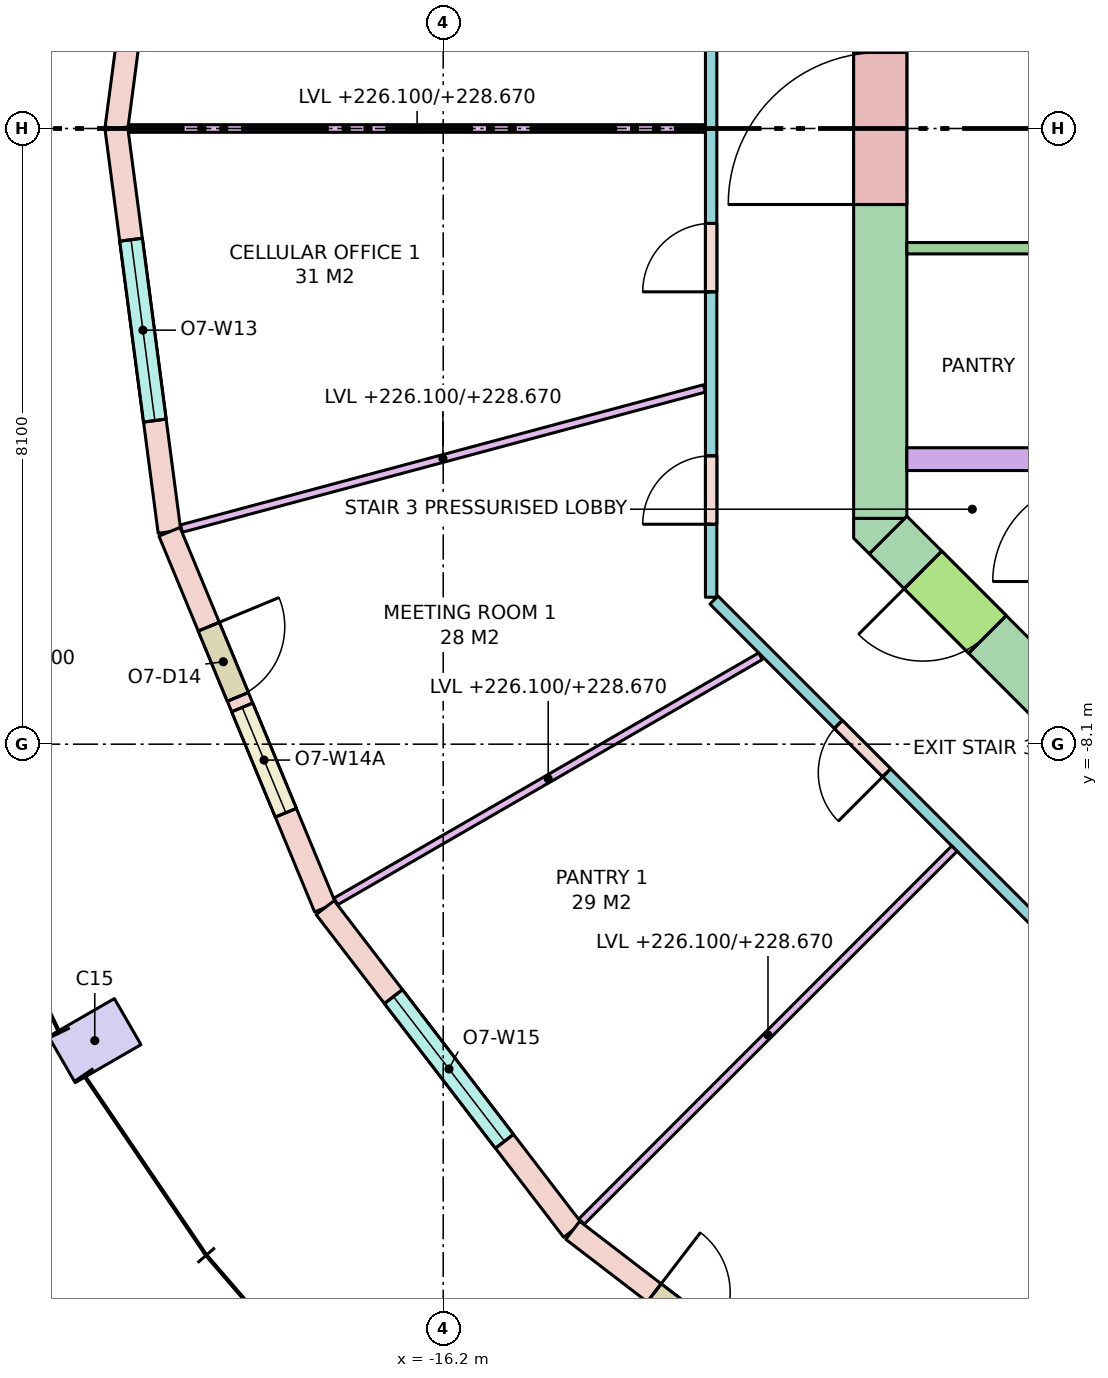
"""IFC4 building model, lengths in metres.
Left out: names, types, materials, properties, quantities, classifications, styles, units other than length and angle.
Written with IfcOpenShell. Run it as: python <this file> out.ifc"""

import sys

from ifc_helpers import new_model, si_unit, direction, frame, frame_2d, origin, origin_2d, place, context, subcontext, project, spatial, polyline, rectangle, outline, extrude, element, fill, save


model = new_model("IFC4")
c1 = context("Model", 3, precision=1e-05, world=origin(), true_north=direction((0.0, 1.0)))
c2 = subcontext(c1, "Body", "Model", "MODEL_VIEW")
j1 = project(units=[si_unit("LENGTHUNIT", "METRE"), si_unit("PLANEANGLEUNIT", "RADIAN")], contexts=[c1])
p1 = place(None, origin())
s1 = spatial("IfcSite", under=j1, at=p1, CompositionType="ELEMENT")
p2 = place(p1, origin())
s2 = spatial("IfcBuilding", under=s1, at=p2, CompositionType="ELEMENT")
p3 = place(p2, frame((0.0, 0.0, 226.1)))
s3 = spatial("IfcBuildingStorey", under=s2, at=p3, CompositionType="ELEMENT", Elevation=226.1)
p4 = place(p3, frame((-20.785, -12.0, 0.0), z_axis=(0.0, 0.0, 1.0), x_axis=(0.5, -0.866025403784, 0.0)))
e1 = element("IfcColumn", 1, at=p4, inside=s3, PredefinedType="COLUMN", context=c2, shape_type="SweptSolid", body=[
    extrude(rectangle(XDim=0.7, YDim=1.0, at=origin_2d()), origin(), (0.0, 0.0, 1.0), 3.7),
])
p5 = place(p3, frame((-10.45, -5.13, -0.28), z_axis=(0.0, 0.0, 1.0), x_axis=(0.0, 1.0, 0.0)))
e2 = element("IfcWall", 2, at=p5, inside=s3, PredefinedType="SHEAR", context=c2, shape_type="SweptSolid", body=[
    extrude(rectangle(XDim=10.26, YDim=0.7, at=frame_2d((5.13, 0.0))), origin(), (0.0, 0.0, 1.0), 3.7),
])
p6 = place(p5, frame((4.13, 0.0, 0.28)))
e3 = element("IfcOpeningElement", 3, at=p6, cuts=e2, PredefinedType="OPENING", context=c2, shape_type="SweptSolid", body=[
    extrude(rectangle(XDim=2.0, YDim=2.1, at=frame_2d((1.0, 1.05))), frame((0.0, 0.36, 0.0), z_axis=(0.0, -1.0, 0.0), x_axis=(1.0, 0.0, 0.0)), (0.0, 0.0, 1.0), 0.72),
])
p7 = place(p3, frame((-7.347, -8.347, -0.28), z_axis=(0.0, 0.0, 1.0), x_axis=(-0.707106781187, 0.707106781187, 0.0)))
e4 = element("IfcWall", 4, at=p7, inside=s3, PredefinedType="SHEAR", context=c2, shape_type="SweptSolid", body=[
    extrude(rectangle(XDim=4.243, YDim=0.7, at=frame_2d((2.121, 0.0))), origin(), (0.0, 0.0, 1.0), 3.7),
])
p8 = place(p7, frame((2.393, 0.0, 0.28)))
e5 = element("IfcOpeningElement", 5, at=p8, cuts=e4, PredefinedType="OPENING", context=c2, shape_type="SweptSolid", body=[
    extrude(rectangle(XDim=1.2, YDim=2.1, at=frame_2d((0.6, 1.05))), frame((0.0, 0.36, 0.0), z_axis=(0.0, -1.0, 0.0), x_axis=(1.0, 0.0, 0.0)), (0.0, 0.0, 1.0), 0.72),
])
p9 = place(p3, frame((0.0, 0.0, -0.28)))
e6 = element("IfcWall", 6, at=p9, inside=s3, PredefinedType="SHEAR", context=c2, shape_type="SweptSolid", body=[
    extrude(outline(polyline([(-10.8, -5.39), (-10.8, -5.13), (-10.8, -5.13), (-10.13, -5.13), (-10.595, -5.595), (-10.595, -5.595), (-10.595, -5.595), (-10.8, -5.39)])), origin(), (0.0, 0.0, 1.0), 3.7),
])
p10 = place(p3, frame((-10.1, -4.35, 0.0), z_axis=(0.0, 0.0, 1.0), x_axis=(1.0, 0.0, 0.0)))
e7 = element("IfcWall", 7, at=p10, inside=s3, PredefinedType="SOLIDWALL", context=c2, shape_type="SweptSolid", body=[
    extrude(rectangle(XDim=8.1, YDim=0.3, at=frame_2d((4.05, 0.0))), origin(), (0.0, 0.0, 1.0), 3.42),
])
p11 = place(p3, frame((-19.802, 5.306, 0.0), z_axis=(0.0, 0.0, 1.0), x_axis=(-0.130517056518, -0.991446064069, 0.0)))
e8 = element("IfcWall", 8, at=p11, inside=s3, PredefinedType="STANDARD", context=c2, shape_type="SweptSolid", body=[
    extrude(rectangle(XDim=5.352, YDim=0.3, at=frame_2d((2.676, 0.0))), origin(), (0.0, 0.0, 1.0), 3.42),
])
p12 = place(p11, frame((1.351, 0.0, 0.0)))
e9 = element("IfcOpeningElement", 9, at=p12, cuts=e8, PredefinedType="OPENING", context=c2, shape_type="SweptSolid", body=[
    extrude(rectangle(XDim=1.0, YDim=2.4, at=frame_2d((0.5, 1.2))), frame((0.0, 0.16, 0.0), z_axis=(0.0, -1.0, 0.0), x_axis=(1.0, 0.0, 0.0)), (0.0, 0.0, 1.0), 0.32),
])
p13 = place(p11, frame((2.501, 0.0, 0.8)))
e10 = element("IfcOpeningElement", 10, at=p13, cuts=e8, PredefinedType="OPENING", context=c2, shape_type="SweptSolid", body=[
    extrude(rectangle(XDim=1.5, YDim=2.4, at=frame_2d((0.75, 1.2))), frame((0.0, 0.16, 0.0), z_axis=(0.0, -1.0, 0.0), x_axis=(1.0, 0.0, 0.0)), (0.0, 0.0, 1.0), 0.32),
])
p14 = place(p3, frame((-20.5, 0.0, 0.0), z_axis=(0.0, 0.0, 1.0), x_axis=(0.130517056518, -0.991446064069, 0.0)))
e11 = element("IfcWall", 11, at=p14, inside=s3, PredefinedType="STANDARD", context=c2, shape_type="SweptSolid", body=[
    extrude(rectangle(XDim=5.352, YDim=0.3, at=frame_2d((2.676, 0.0))), origin(), (0.0, 0.0, 1.0), 3.42),
])
p15 = place(p14, frame((1.476, 0.0, 0.8)))
e12 = element("IfcOpeningElement", 12, at=p15, cuts=e11, PredefinedType="OPENING", context=c2, shape_type="SweptSolid", body=[
    extrude(rectangle(XDim=2.4, YDim=2.4, at=frame_2d((1.2, 1.2))), frame((0.0, 0.16, 0.0), z_axis=(0.0, -1.0, 0.0), x_axis=(1.0, 0.0, 0.0)), (0.0, 0.0, 1.0), 0.32),
])
p16 = place(p3, frame((-19.802, -5.306, 0.0), z_axis=(0.0, 0.0, 1.0), x_axis=(0.382713071139, -0.923867255172, 0.0)))
e13 = element("IfcWall", 13, at=p16, inside=s3, PredefinedType="STANDARD", context=c2, shape_type="SweptSolid", body=[
    extrude(rectangle(XDim=5.352, YDim=0.3, at=frame_2d((2.676, 0.0))), origin(), (0.0, 0.0, 1.0), 3.42),
])
p17 = place(p16, frame((1.351, 0.0, 0.0)))
e14 = element("IfcOpeningElement", 14, at=p17, cuts=e13, PredefinedType="OPENING", context=c2, shape_type="SweptSolid", body=[
    extrude(rectangle(XDim=1.0, YDim=2.4, at=frame_2d((0.5, 1.2))), frame((0.0, 0.16, 0.0), z_axis=(0.0, -1.0, 0.0), x_axis=(1.0, 0.0, 0.0)), (0.0, 0.0, 1.0), 0.32),
])
p18 = place(p16, frame((2.501, 0.0, 0.8)))
e15 = element("IfcOpeningElement", 15, at=p18, cuts=e13, PredefinedType="OPENING", context=c2, shape_type="SweptSolid", body=[
    extrude(rectangle(XDim=1.5, YDim=2.4, at=frame_2d((0.75, 1.2))), frame((0.0, 0.16, 0.0), z_axis=(0.0, -1.0, 0.0), x_axis=(1.0, 0.0, 0.0)), (0.0, 0.0, 1.0), 0.32),
])
p19 = place(p3, frame((-17.753, -10.25, 0.0), z_axis=(0.0, 0.0, 1.0), x_axis=(0.60876670321, -0.793349293227, 0.0)))
e16 = element("IfcWall", 16, at=p19, inside=s3, PredefinedType="STANDARD", context=c2, shape_type="SweptSolid", body=[
    extrude(rectangle(XDim=5.352, YDim=0.3, at=frame_2d((2.676, 0.0))), origin(), (0.0, 0.0, 1.0), 3.42),
])
p20 = place(p19, frame((1.476, 0.0, 0.8)))
e17 = element("IfcOpeningElement", 17, at=p20, cuts=e16, PredefinedType="OPENING", context=c2, shape_type="SweptSolid", body=[
    extrude(rectangle(XDim=2.4, YDim=2.4, at=frame_2d((1.2, 1.2))), frame((0.0, 0.16, 0.0), z_axis=(0.0, -1.0, 0.0), x_axis=(1.0, 0.0, 0.0)), (0.0, 0.0, 1.0), 0.32),
])
p21 = place(p3, frame((-14.496, -14.496, 0.0), z_axis=(0.0, 0.0, 1.0), x_axis=(0.793349293227, -0.60876670321, 0.0)))
e18 = element("IfcWall", 18, at=p21, inside=s3, PredefinedType="STANDARD", context=c2, shape_type="SweptSolid", body=[
    extrude(rectangle(XDim=5.352, YDim=0.3, at=frame_2d((2.676, 0.0))), origin(), (0.0, 0.0, 1.0), 3.42),
])
p22 = place(p21, frame((1.351, 0.0, 0.0)))
e19 = element("IfcOpeningElement", 19, at=p22, cuts=e18, PredefinedType="OPENING", context=c2, shape_type="SweptSolid", body=[
    extrude(rectangle(XDim=1.0, YDim=2.4, at=frame_2d((0.5, 1.2))), frame((0.0, 0.16, 0.0), z_axis=(0.0, -1.0, 0.0), x_axis=(1.0, 0.0, 0.0)), (0.0, 0.0, 1.0), 0.32),
])
p23 = place(p21, frame((2.501, 0.0, 0.8)))
e20 = element("IfcOpeningElement", 20, at=p23, cuts=e18, PredefinedType="OPENING", context=c2, shape_type="SweptSolid", body=[
    extrude(rectangle(XDim=1.5, YDim=2.4, at=frame_2d((0.75, 1.2))), frame((0.0, 0.16, 0.0), z_axis=(0.0, -1.0, 0.0), x_axis=(1.0, 0.0, 0.0)), (0.0, 0.0, 1.0), 0.32),
])
p24 = place(p3, frame((-10.1, -1.575, 0.0), z_axis=(0.0, 0.0, 1.0), x_axis=(1.0, 0.0, 0.0)))
e21 = element("IfcWall", 21, at=p24, inside=s3, PredefinedType="PARTITIONING", context=c2, shape_type="SweptSolid", body=[
    extrude(rectangle(XDim=8.1, YDim=0.15, at=frame_2d((4.05, 0.0))), origin(), (0.0, 0.0, 1.0), 3.42),
])
p25 = place(p24, frame((2.333, 0.0, 0.0)))
e22 = element("IfcOpeningElement", 22, at=p25, cuts=e21, PredefinedType="OPENING", context=c2, shape_type="SweptSolid", body=[
    extrude(rectangle(XDim=0.9, YDim=2.1, at=frame_2d((0.45, 1.05))), frame((0.0, 0.085, 0.0), z_axis=(0.0, -1.0, 0.0), x_axis=(1.0, 0.0, 0.0)), (0.0, 0.0, 1.0), 0.17),
])
p26 = place(p24, frame((6.35, 0.0, 0.0)))
e23 = element("IfcOpeningElement", 23, at=p26, cuts=e21, PredefinedType="OPENING", context=c2, shape_type="SweptSolid", body=[
    extrude(rectangle(XDim=0.9, YDim=2.1, at=frame_2d((0.45, 1.05))), frame((0.0, 0.085, 0.0), z_axis=(0.0, -1.0, 0.0), x_axis=(1.0, 0.0, 0.0)), (0.0, 0.0, 1.0), 0.17),
])
p27 = place(p3, frame((-8.204, -10.638, 0.0), z_axis=(0.0, 0.0, 1.0), x_axis=(-0.707106781187, 0.707106781187, 0.0)))
e24 = element("IfcWall", 24, at=p27, inside=s3, PredefinedType="PARTITIONING", context=c2, shape_type="SweptSolid", body=[
    extrude(rectangle(XDim=6.271, YDim=0.15, at=frame_2d((3.135, 0.0))), origin(), (0.0, 0.0, 1.0), 2.57),
])
p28 = place(p27, frame((3.057, 0.0, 0.0)))
e25 = element("IfcOpeningElement", 25, at=p28, cuts=e24, PredefinedType="OPENING", context=c2, shape_type="SweptSolid", body=[
    extrude(rectangle(XDim=0.9, YDim=2.1, at=frame_2d((0.45, 1.05))), frame((0.0, 0.085, 0.0), z_axis=(0.0, -1.0, 0.0), x_axis=(1.0, 0.0, 0.0)), (0.0, 0.0, 1.0), 0.17),
])
p29 = place(p3, frame((-12.675, -6.167, 0.0), z_axis=(0.0, 0.0, 1.0), x_axis=(0.0, 1.0, 0.0)))
e26 = element("IfcWall", 26, at=p29, inside=s3, PredefinedType="PARTITIONING", context=c2, shape_type="SweptSolid", body=[
    extrude(rectangle(XDim=12.333, YDim=0.15, at=frame_2d((6.167, 0.0))), origin(), (0.0, 0.0, 1.0), 2.57),
])
p30 = place(p29, frame((4.018, 0.0, 0.0)))
e27 = element("IfcOpeningElement", 27, at=p30, cuts=e26, PredefinedType="OPENING", context=c2, shape_type="SweptSolid", body=[
    extrude(rectangle(XDim=0.9, YDim=2.1, at=frame_2d((0.45, 1.05))), frame((0.0, 0.085, 0.0), z_axis=(0.0, -1.0, 0.0), x_axis=(1.0, 0.0, 0.0)), (0.0, 0.0, 1.0), 0.17),
])
p31 = place(p29, frame((0.96, 0.0, 0.0)))
e28 = element("IfcOpeningElement", 28, at=p31, cuts=e26, PredefinedType="OPENING", context=c2, shape_type="SweptSolid", body=[
    extrude(rectangle(XDim=0.9, YDim=2.1, at=frame_2d((0.45, 1.05))), frame((0.0, 0.085, 0.0), z_axis=(0.0, -1.0, 0.0), x_axis=(1.0, 0.0, 0.0)), (0.0, 0.0, 1.0), 0.17),
])
p32 = place(p3, frame((-12.75, 0.0, 0.0), z_axis=(0.0, 0.0, 1.0), x_axis=(-1.0, 0.0, 0.0)))
e29 = element("IfcWall", 29, at=p32, inside=s3, PredefinedType="PARTITIONING", context=c2, shape_type="SweptSolid", body=[
    extrude(rectangle(XDim=7.587, YDim=0.1, at=frame_2d((3.793, 0.0))), origin(), (0.0, 0.0, 1.0), 2.57),
])
p33 = place(p3, frame((-12.764, -3.42, 0.0), z_axis=(0.0, 0.0, 1.0), x_axis=(-0.965928160208, -0.258810334643, 0.0)))
e30 = element("IfcWall", 30, at=p33, inside=s3, PredefinedType="PARTITIONING", context=c2, shape_type="SweptSolid", body=[
    extrude(rectangle(XDim=7.122, YDim=0.1, at=frame_2d((3.561, 0.0))), origin(), (0.0, 0.0, 1.0), 2.57),
])
p34 = place(p3, frame((-12.025, -6.943, 0.0), z_axis=(0.0, 0.0, 1.0), x_axis=(-0.866026773083, -0.499997628298, 0.0)))
e31 = element("IfcWall", 31, at=p34, inside=s3, PredefinedType="PARTITIONING", context=c2, shape_type="SweptSolid", body=[
    extrude(rectangle(XDim=6.451, YDim=0.1, at=frame_2d((3.226, 0.0))), origin(), (0.0, 0.0, 1.0), 2.57),
])
p35 = place(p3, frame((-9.474, -9.474, 0.0), z_axis=(0.0, 0.0, 1.0), x_axis=(-0.707106781187, -0.707106781187, 0.0)))
e32 = element("IfcWall", 32, at=p35, inside=s3, PredefinedType="PARTITIONING", context=c2, shape_type="SweptSolid", body=[
    extrude(rectangle(XDim=6.938, YDim=0.1, at=frame_2d((3.469, 0.0))), origin(), (0.0, 0.0, 1.0), 2.57),
])
p36 = place(p15, origin())
e33 = element("IfcWindow", 33, at=p36, inside=s3, PartitioningType="SINGLE_PANEL", PredefinedType="WINDOW", context=c2, shape_type="SweptSolid", body=[
    extrude(rectangle(XDim=2.4, YDim=2.4, at=frame_2d((1.2, 1.2))), frame((0.0, 0.03, 0.0), z_axis=(0.0, -1.0, 0.0), x_axis=(1.0, 0.0, 0.0)), (0.0, 0.0, 1.0), 0.06),
])
fill(e12, e33)
p37 = place(p17, origin())
e34 = element("IfcDoor", 34, at=p37, inside=s3, OperationType="SINGLE_SWING_LEFT", PredefinedType="DOOR", context=c2, shape_type="SweptSolid", body=[
    extrude(rectangle(XDim=1.0, YDim=2.4, at=frame_2d((0.5, 1.2))), frame((0.0, 0.025, 0.0), z_axis=(0.0, -1.0, 0.0), x_axis=(1.0, 0.0, 0.0)), (0.0, 0.0, 1.0), 0.05),
])
fill(e14, e34)
p38 = place(p18, origin())
e35 = element("IfcWindow", 35, at=p38, inside=s3, PartitioningType="SINGLE_PANEL", PredefinedType="WINDOW", context=c2, shape_type="SweptSolid", body=[
    extrude(rectangle(XDim=1.5, YDim=2.4, at=frame_2d((0.75, 1.2))), frame((0.0, 0.03, 0.0), z_axis=(0.0, -1.0, 0.0), x_axis=(1.0, 0.0, 0.0)), (0.0, 0.0, 1.0), 0.06),
])
fill(e15, e35)
p39 = place(p20, origin())
e36 = element("IfcWindow", 36, at=p39, inside=s3, PartitioningType="SINGLE_PANEL", PredefinedType="WINDOW", context=c2, shape_type="SweptSolid", body=[
    extrude(rectangle(XDim=2.4, YDim=2.4, at=frame_2d((1.2, 1.2))), frame((0.0, 0.03, 0.0), z_axis=(0.0, -1.0, 0.0), x_axis=(1.0, 0.0, 0.0)), (0.0, 0.0, 1.0), 0.06),
])
fill(e17, e36)
p40 = place(p22, origin())
e37 = element("IfcDoor", 37, at=p40, inside=s3, OperationType="SINGLE_SWING_LEFT", PredefinedType="DOOR", context=c2, shape_type="SweptSolid", body=[
    extrude(rectangle(XDim=1.0, YDim=2.4, at=frame_2d((0.5, 1.2))), frame((0.0, 0.025, 0.0), z_axis=(0.0, -1.0, 0.0), x_axis=(1.0, 0.0, 0.0)), (0.0, 0.0, 1.0), 0.05),
])
fill(e19, e37)
p41 = place(p8, origin())
e38 = element("IfcDoor", 38, at=p41, inside=s3, OperationType="SINGLE_SWING_RIGHT", PredefinedType="DOOR", context=c2, shape_type="SweptSolid", body=[
    extrude(rectangle(XDim=1.2, YDim=2.1, at=frame_2d((0.6, 1.05))), frame((0.0, 0.025, 0.0), z_axis=(0.0, -1.0, 0.0), x_axis=(1.0, 0.0, 0.0)), (0.0, 0.0, 1.0), 0.05),
])
fill(e5, e38)
p42 = place(p6, origin())
e39 = element("IfcDoor", 39, at=p42, inside=s3, OperationType="DOUBLE_DOOR_SINGLE_SWING", PredefinedType="DOOR", context=c2, shape_type="SweptSolid", body=[
    extrude(rectangle(XDim=2.0, YDim=2.1, at=frame_2d((1.0, 1.05))), frame((0.0, 0.025, 0.0), z_axis=(0.0, -1.0, 0.0), x_axis=(1.0, 0.0, 0.0)), (0.0, 0.0, 1.0), 0.05),
])
fill(e3, e39)
p43 = place(p30, origin())
e40 = element("IfcDoor", 40, at=p43, inside=s3, OperationType="SINGLE_SWING_LEFT", PredefinedType="DOOR", context=c2, shape_type="SweptSolid", body=[
    extrude(rectangle(XDim=0.9, YDim=2.1, at=frame_2d((0.45, 1.05))), frame((0.0, 0.025, 0.0), z_axis=(0.0, -1.0, 0.0), x_axis=(1.0, 0.0, 0.0)), (0.0, 0.0, 1.0), 0.05),
])
fill(e27, e40)
p44 = place(p31, origin())
e41 = element("IfcDoor", 41, at=p44, inside=s3, OperationType="SINGLE_SWING_LEFT", PredefinedType="DOOR", context=c2, shape_type="SweptSolid", body=[
    extrude(rectangle(XDim=0.9, YDim=2.1, at=frame_2d((0.45, 1.05))), frame((0.0, 0.025, 0.0), z_axis=(0.0, -1.0, 0.0), x_axis=(1.0, 0.0, 0.0)), (0.0, 0.0, 1.0), 0.05),
])
fill(e28, e41)
p45 = place(p28, origin())
e42 = element("IfcDoor", 42, at=p45, inside=s3, OperationType="SINGLE_SWING_LEFT", PredefinedType="DOOR", context=c2, shape_type="SweptSolid", body=[
    extrude(rectangle(XDim=0.9, YDim=2.1, at=frame_2d((0.45, 1.05))), frame((0.0, 0.025, 0.0), z_axis=(0.0, -1.0, 0.0), x_axis=(1.0, 0.0, 0.0)), (0.0, 0.0, 1.0), 0.05),
])
fill(e25, e42)
save(model, sys.argv[1])
